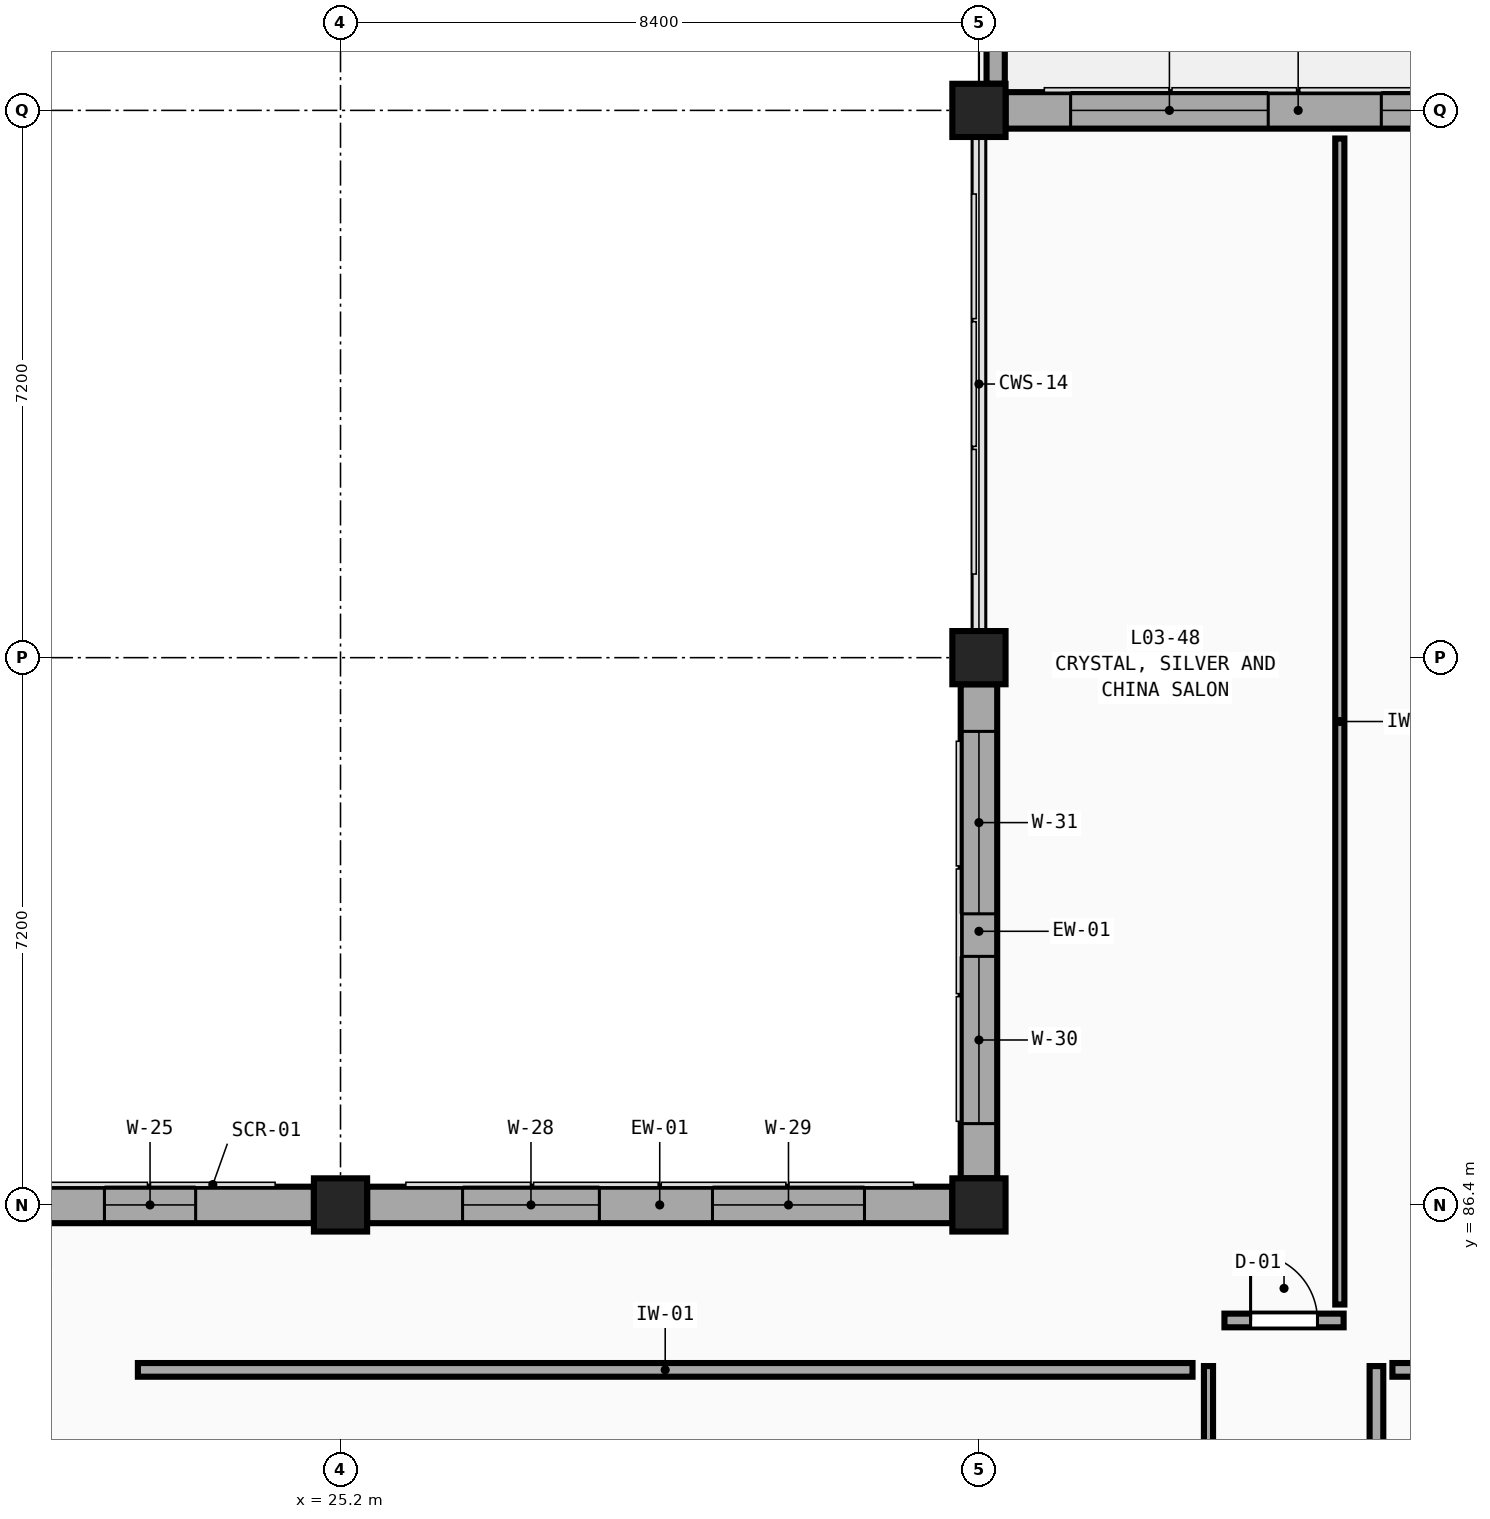
"""IFC4 building model, lengths in metres.
Left out: names, types, materials, properties, quantities, classifications, styles, units other than length and angle.
Written with IfcOpenShell. Run it as: python <this file> out.ifc"""

import sys

from ifc_helpers import new_model, si_unit, direction, frame, frame_2d, origin, origin_2d, place, context, subcontext, project, spatial, rectangle, extrude, element, fill, save


model = new_model("IFC4")
c1 = context("Model", 3, precision=1e-05, world=origin(), true_north=direction((0.0, 1.0)))
c2 = subcontext(c1, "Body", "Model", "MODEL_VIEW")
j1 = project(units=[si_unit("LENGTHUNIT", "METRE"), si_unit("PLANEANGLEUNIT", "RADIAN")], contexts=[c1])
p1 = place(None, origin())
s1 = spatial("IfcSite", under=j1, at=p1, CompositionType="ELEMENT")
p2 = place(p1, origin())
s2 = spatial("IfcBuilding", under=s1, at=p2, CompositionType="ELEMENT")
p3 = place(p2, frame((0.0, 0.0, 14.4)))
s3 = spatial("IfcBuildingStorey", under=s2, at=p3, CompositionType="ELEMENT", Elevation=14.4)
for number, where, z_axis, x_axis in (
    (1, (25.2, 86.4, 0.0), (0.0, 0.0, 1.0), (1.0, 0.0, 0.0)),
    (2, (33.6, 86.4, 0.0), (0.0, 0.0, 1.0), (1.0, 0.0, 0.0)),
    (3, (33.6, 93.6, 0.0), (0.0, 0.0, 1.0), (1.0, 0.0, 0.0)),
    (4, (33.6, 100.8, 0.0), (0.0, 0.0, 1.0), (1.0, 0.0, 0.0)),
):
    element("IfcColumn", number, at=place(p3, frame(where, z_axis=z_axis, x_axis=x_axis)), inside=s3, PredefinedType="COLUMN", context=c2, shape_type="SweptSolid", body=[
        extrude(rectangle(XDim=0.7, YDim=0.7, at=origin_2d()), origin(), (0.0, 0.0, 1.0), 4.5),
    ])
p4 = place(p3, frame((17.15, 86.4, 0.0), z_axis=(0.0, 0.0, 1.0), x_axis=(1.0, 0.0, 0.0)))
e5 = element("IfcWall", 5, at=p4, inside=s3, PredefinedType="SOLIDWALL", context=c2, shape_type="SweptSolid", body=[
    extrude(rectangle(XDim=7.7, YDim=0.48, at=frame_2d((3.85, 0.0))), origin(), (0.0, 0.0, 1.0), 3.63),
])
p5 = place(p4, frame((0.856, 0.0, 0.75)))
e6 = element("IfcOpeningElement", 6, at=p5, cuts=e5, PredefinedType="OPENING", context=c2, shape_type="SweptSolid", body=[
    extrude(rectangle(XDim=2.6, YDim=2.26, at=frame_2d((1.3, 1.13))), frame((0.0, 0.26, 0.0), z_axis=(0.0, -1.0, 0.0), x_axis=(1.0, 0.0, 0.0)), (0.0, 0.0, 1.0), 0.52),
])
p6 = place(p4, frame((4.944, 0.0, 0.75)))
e7 = element("IfcOpeningElement", 7, at=p6, cuts=e5, PredefinedType="OPENING", context=c2, shape_type="SweptSolid", body=[
    extrude(rectangle(XDim=1.2, YDim=2.44, at=frame_2d((0.6, 1.22))), frame((0.0, 0.26, 0.0), z_axis=(0.0, -1.0, 0.0), x_axis=(1.0, 0.0, 0.0)), (0.0, 0.0, 1.0), 0.52),
])
p7 = place(p3, frame((25.55, 86.4, 0.0), z_axis=(0.0, 0.0, 1.0), x_axis=(1.0, 0.0, 0.0)))
e8 = element("IfcWall", 8, at=p7, inside=s3, PredefinedType="SOLIDWALL", context=c2, shape_type="SweptSolid", body=[
    extrude(rectangle(XDim=7.7, YDim=0.48, at=frame_2d((3.85, 0.0))), origin(), (0.0, 0.0, 1.0), 3.63),
])
p8 = place(p7, frame((1.256, 0.0, 0.75)))
e9 = element("IfcOpeningElement", 9, at=p8, cuts=e8, PredefinedType="OPENING", context=c2, shape_type="SweptSolid", body=[
    extrude(rectangle(XDim=1.8, YDim=2.44, at=frame_2d((0.9, 1.22))), frame((0.0, 0.26, 0.0), z_axis=(0.0, -1.0, 0.0), x_axis=(1.0, 0.0, 0.0)), (0.0, 0.0, 1.0), 0.52),
])
p9 = place(p7, frame((4.544, 0.0, 0.75)))
e10 = element("IfcOpeningElement", 10, at=p9, cuts=e8, PredefinedType="OPENING", context=c2, shape_type="SweptSolid", body=[
    extrude(rectangle(XDim=2.0, YDim=2.44, at=frame_2d((1.0, 1.22))), frame((0.0, 0.26, 0.0), z_axis=(0.0, -1.0, 0.0), x_axis=(1.0, 0.0, 0.0)), (0.0, 0.0, 1.0), 0.52),
])
p10 = place(p3, frame((33.6, 86.75, 0.0), z_axis=(0.0, 0.0, 1.0), x_axis=(0.0, 1.0, 0.0)))
e11 = element("IfcWall", 11, at=p10, inside=s3, PredefinedType="SOLIDWALL", context=c2, shape_type="SweptSolid", body=[
    extrude(rectangle(XDim=6.5, YDim=0.48, at=frame_2d((3.25, 0.0))), origin(), (0.0, 0.0, 1.0), 3.63),
])
p11 = place(p10, frame((0.72, 0.0, 0.75)))
e12 = element("IfcOpeningElement", 12, at=p11, cuts=e11, PredefinedType="OPENING", context=c2, shape_type="SweptSolid", body=[
    extrude(rectangle(XDim=2.2, YDim=2.44, at=frame_2d((1.1, 1.22))), frame((0.0, 0.26, 0.0), z_axis=(0.0, -1.0, 0.0), x_axis=(1.0, 0.0, 0.0)), (0.0, 0.0, 1.0), 0.52),
])
p12 = place(p10, frame((3.48, 0.0, 0.75)))
e13 = element("IfcOpeningElement", 13, at=p12, cuts=e11, PredefinedType="OPENING", context=c2, shape_type="SweptSolid", body=[
    extrude(rectangle(XDim=2.4, YDim=2.44, at=frame_2d((1.2, 1.22))), frame((0.0, 0.26, 0.0), z_axis=(0.0, -1.0, 0.0), x_axis=(1.0, 0.0, 0.0)), (0.0, 0.0, 1.0), 0.52),
])
p13 = place(p3, frame((33.95, 100.8, 0.0), z_axis=(0.0, 0.0, 1.0), x_axis=(1.0, 0.0, 0.0)))
e14 = element("IfcWall", 14, at=p13, inside=s3, PredefinedType="SOLIDWALL", context=c2, shape_type="SweptSolid", body=[
    extrude(rectangle(XDim=7.7, YDim=0.48, at=frame_2d((3.85, 0.0))), origin(), (0.0, 0.0, 1.0), 3.63),
])
p14 = place(p13, frame((0.856, 0.0, 0.75)))
e15 = element("IfcOpeningElement", 15, at=p14, cuts=e14, PredefinedType="OPENING", context=c2, shape_type="SweptSolid", body=[
    extrude(rectangle(XDim=2.6, YDim=2.44, at=frame_2d((1.3, 1.22))), frame((0.0, 0.26, 0.0), z_axis=(0.0, -1.0, 0.0), x_axis=(1.0, 0.0, 0.0)), (0.0, 0.0, 1.0), 0.52),
])
p15 = place(p13, frame((4.944, 0.0, 0.75)))
e16 = element("IfcOpeningElement", 16, at=p15, cuts=e14, PredefinedType="OPENING", context=c2, shape_type="SweptSolid", body=[
    extrude(rectangle(XDim=1.2, YDim=2.62, at=frame_2d((0.6, 1.31))), frame((0.0, 0.26, 0.0), z_axis=(0.0, -1.0, 0.0), x_axis=(1.0, 0.0, 0.0)), (0.0, 0.0, 1.0), 0.52),
])
p16 = place(p3, frame((33.82, 101.15, 0.0), z_axis=(0.0, 0.0, 1.0), x_axis=(0.0, 1.0, 0.0)))
e17 = element("IfcWall", 17, at=p16, inside=s3, PredefinedType="PARAPET", context=c2, shape_type="SweptSolid", body=[
    extrude(rectangle(XDim=6.5, YDim=0.24, at=frame_2d((3.25, 0.0))), origin(), (0.0, 0.0, 1.0), 1.15),
])
p17 = place(p3, frame((36.62, 70.53, 0.0), z_axis=(0.0, 0.0, 1.0), x_axis=(0.0, 1.0, 0.0)))
e18 = element("IfcWall", 18, at=p17, inside=s3, PredefinedType="PARTITIONING", context=c2, shape_type="SweptSolid", body=[
    extrude(rectangle(XDim=13.75, YDim=0.12, at=frame_2d((6.875, 0.0))), origin(), (0.0, 0.0, 1.0), 4.18),
])
p18 = place(p17, frame((6.115, 0.0, 0.0)))
e19 = element("IfcOpeningElement", 19, at=p18, cuts=e18, PredefinedType="OPENING", context=c2, shape_type="SweptSolid", body=[
    extrude(rectangle(XDim=1.52, YDim=2.05, at=frame_2d((0.76, 1.025))), frame((0.0, 0.08, 0.0), z_axis=(0.0, -1.0, 0.0), x_axis=(1.0, 0.0, 0.0)), (0.0, 0.0, 1.0), 0.16),
])
p19 = place(p3, frame((38.83, 70.53, 0.0), z_axis=(0.0, 0.0, 1.0), x_axis=(0.0, 1.0, 0.0)))
e20 = element("IfcWall", 20, at=p19, inside=s3, PredefinedType="PARTITIONING", context=c2, shape_type="SweptSolid", body=[
    extrude(rectangle(XDim=13.75, YDim=0.18, at=frame_2d((6.875, 0.0))), origin(), (0.0, 0.0, 1.0), 4.18),
])
p20 = place(p19, frame((6.035, 0.0, 0.0)))
e21 = element("IfcOpeningElement", 21, at=p20, cuts=e20, PredefinedType="OPENING", context=c2, shape_type="SweptSolid", body=[
    extrude(rectangle(XDim=1.68, YDim=2.05, at=frame_2d((0.84, 1.025))), frame((0.0, 0.11, 0.0), z_axis=(0.0, -1.0, 0.0), x_axis=(1.0, 0.0, 0.0)), (0.0, 0.0, 1.0), 0.22),
])
p21 = place(p3, frame((36.83, 84.88, 0.0), z_axis=(0.0, 0.0, 1.0), x_axis=(1.0, 0.0, 0.0)))
e22 = element("IfcWall", 22, at=p21, inside=s3, PredefinedType="PARTITIONING", context=c2, shape_type="SweptSolid", body=[
    extrude(rectangle(XDim=1.568, YDim=0.18, at=frame_2d((0.784, 0.0))), origin(), (0.0, 0.0, 1.0), 4.18),
])
p22 = place(p21, frame((0.344, 0.0, 0.0)))
e23 = element("IfcOpeningElement", 23, at=p22, cuts=e22, PredefinedType="OPENING", context=c2, shape_type="SweptSolid", body=[
    extrude(rectangle(XDim=0.88, YDim=2.05, at=frame_2d((0.44, 1.025))), frame((0.0, 0.11, 0.0), z_axis=(0.0, -1.0, 0.0), x_axis=(1.0, 0.0, 0.0)), (0.0, 0.0, 1.0), 0.22),
])
p23 = place(p3, frame((38.348, 85.09, 0.0), z_axis=(0.0, 0.0, 1.0), x_axis=(0.0, 1.0, 0.0)))
e24 = element("IfcWall", 24, at=p23, inside=s3, PredefinedType="PARTITIONING", context=c2, shape_type="SweptSolid", body=[
    extrude(rectangle(XDim=15.34, YDim=0.12, at=frame_2d((7.67, 0.0))), origin(), (0.0, 0.0, 1.0), 4.18),
])
p24 = place(p3, frame((39.04, 84.23, 0.0), z_axis=(0.0, 0.0, 1.0), x_axis=(1.0, 0.0, 0.0)))
e25 = element("IfcWall", 25, at=p24, inside=s3, PredefinedType="PARTITIONING", context=c2, shape_type="SweptSolid", body=[
    extrude(rectangle(XDim=14.17, YDim=0.18, at=frame_2d((7.085, 0.0))), origin(), (0.0, 0.0, 1.0), 4.18),
])
p25 = place(p3, frame((22.534, 84.23, 0.0), z_axis=(0.0, 0.0, 1.0), x_axis=(1.0, 0.0, 0.0)))
e26 = element("IfcWall", 26, at=p25, inside=s3, PredefinedType="PARTITIONING", context=c2, shape_type="SweptSolid", body=[
    extrude(rectangle(XDim=13.876, YDim=0.18, at=frame_2d((6.938, 0.0))), origin(), (0.0, 0.0, 1.0), 4.18),
])
p26 = place(p6, origin())
e27 = element("IfcWindow", 27, at=p26, inside=s3, PartitioningType="SINGLE_PANEL", PredefinedType="WINDOW", context=c2, shape_type="SweptSolid", body=[
    extrude(rectangle(XDim=1.2, YDim=2.44, at=frame_2d((0.6, 1.22))), frame((0.0, 0.03, 0.0), z_axis=(0.0, -1.0, 0.0), x_axis=(1.0, 0.0, 0.0)), (0.0, 0.0, 1.0), 0.06),
])
fill(e7, e27)
p27 = place(p8, origin())
e28 = element("IfcWindow", 28, at=p27, inside=s3, PartitioningType="DOUBLE_PANEL_VERTICAL", PredefinedType="WINDOW", context=c2, shape_type="SweptSolid", body=[
    extrude(rectangle(XDim=1.8, YDim=2.44, at=frame_2d((0.9, 1.22))), frame((0.0, 0.03, 0.0), z_axis=(0.0, -1.0, 0.0), x_axis=(1.0, 0.0, 0.0)), (0.0, 0.0, 1.0), 0.06),
])
fill(e9, e28)
p28 = place(p9, origin())
e29 = element("IfcWindow", 29, at=p28, inside=s3, PartitioningType="TRIPLE_PANEL_VERTICAL", PredefinedType="WINDOW", context=c2, shape_type="SweptSolid", body=[
    extrude(rectangle(XDim=2.0, YDim=2.44, at=frame_2d((1.0, 1.22))), frame((0.0, 0.03, 0.0), z_axis=(0.0, -1.0, 0.0), x_axis=(1.0, 0.0, 0.0)), (0.0, 0.0, 1.0), 0.06),
])
fill(e10, e29)
p29 = place(p11, origin())
e30 = element("IfcWindow", 30, at=p29, inside=s3, PartitioningType="TRIPLE_PANEL_VERTICAL", PredefinedType="WINDOW", context=c2, shape_type="SweptSolid", body=[
    extrude(rectangle(XDim=2.2, YDim=2.44, at=frame_2d((1.1, 1.22))), frame((0.0, 0.03, 0.0), z_axis=(0.0, -1.0, 0.0), x_axis=(1.0, 0.0, 0.0)), (0.0, 0.0, 1.0), 0.06),
])
fill(e12, e30)
p30 = place(p12, origin())
e31 = element("IfcWindow", 31, at=p30, inside=s3, PartitioningType="TRIPLE_PANEL_VERTICAL", PredefinedType="WINDOW", context=c2, shape_type="SweptSolid", body=[
    extrude(rectangle(XDim=2.4, YDim=2.44, at=frame_2d((1.2, 1.22))), frame((0.0, 0.03, 0.0), z_axis=(0.0, -1.0, 0.0), x_axis=(1.0, 0.0, 0.0)), (0.0, 0.0, 1.0), 0.06),
])
fill(e13, e31)
p31 = place(p14, origin())
e32 = element("IfcWindow", 32, at=p31, inside=s3, PartitioningType="TRIPLE_PANEL_VERTICAL", PredefinedType="WINDOW", context=c2, shape_type="SweptSolid", body=[
    extrude(rectangle(XDim=2.6, YDim=2.44, at=frame_2d((1.3, 1.22))), frame((0.0, 0.03, 0.0), z_axis=(0.0, -1.0, 0.0), x_axis=(1.0, 0.0, 0.0)), (0.0, 0.0, 1.0), 0.06),
])
fill(e15, e32)
p32 = place(p15, origin())
e33 = element("IfcWindow", 33, at=p32, inside=s3, PartitioningType="SINGLE_PANEL", PredefinedType="WINDOW", context=c2, shape_type="SweptSolid", body=[
    extrude(rectangle(XDim=1.2, YDim=2.62, at=frame_2d((0.6, 1.31))), frame((0.0, 0.03, 0.0), z_axis=(0.0, -1.0, 0.0), x_axis=(1.0, 0.0, 0.0)), (0.0, 0.0, 1.0), 0.06),
])
fill(e16, e33)
p33 = place(p22, origin())
e34 = element("IfcDoor", 34, at=p33, inside=s3, OperationType="SINGLE_SWING_LEFT", PredefinedType="DOOR", context=c2, shape_type="SweptSolid", body=[
    extrude(rectangle(XDim=0.88, YDim=2.05, at=frame_2d((0.44, 1.025))), frame((0.0, 0.025, 0.0), z_axis=(0.0, -1.0, 0.0), x_axis=(1.0, 0.0, 0.0)), (0.0, 0.0, 1.0), 0.05),
])
fill(e23, e34)
save(model, sys.argv[1])
